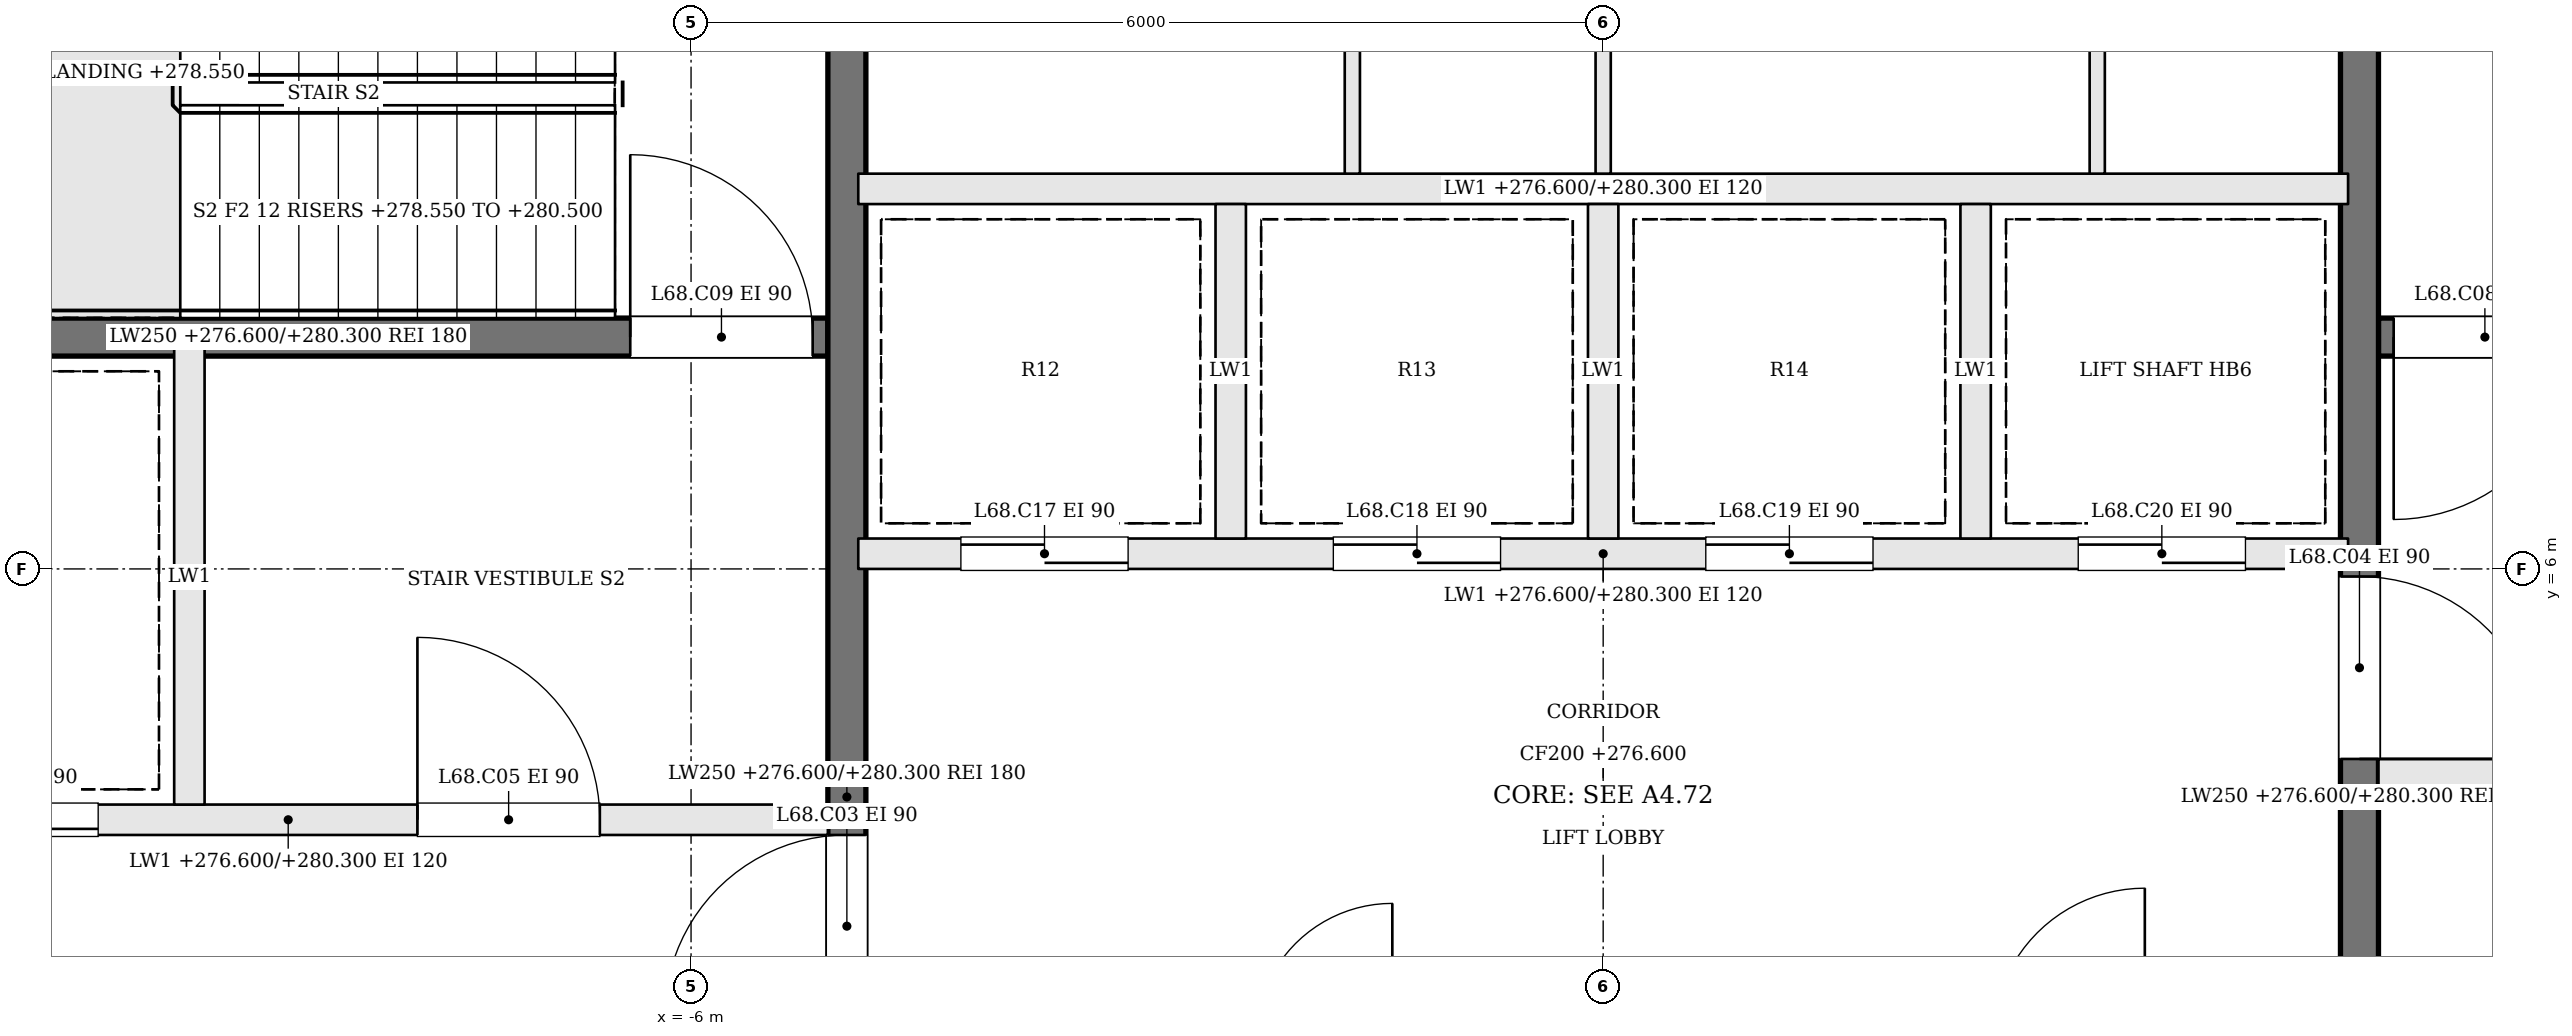
"""IFC4 building model, lengths in metres.
Left out: names, types, materials, properties, quantities, classifications, styles, units other than length and angle.
Written with IfcOpenShell. Run it as: python <this file> out.ifc"""

import sys

from ifc_helpers import new_model, si_unit, direction, frame, frame_2d, origin, place, context, subcontext, project, spatial, rectangle, extrude, element, fill, save


model = new_model("IFC4")
c1 = context("Model", 3, precision=1e-05, world=origin(), true_north=direction((0.0, 1.0)))
c2 = subcontext(c1, "Body", "Model", "MODEL_VIEW")
j1 = project(units=[si_unit("LENGTHUNIT", "METRE"), si_unit("PLANEANGLEUNIT", "RADIAN")], contexts=[c1])
p1 = place(None, origin())
s1 = spatial("IfcSite", under=j1, at=p1, CompositionType="ELEMENT")
p2 = place(p1, origin())
s2 = spatial("IfcBuilding", under=s1, at=p2, CompositionType="ELEMENT")
p3 = place(p2, frame((0.0, 0.0, 276.6)))
s3 = spatial("IfcBuildingStorey", under=s2, at=p3, CompositionType="ELEMENT", Elevation=276.6)
p4 = place(p3, frame((12.2, 7.525, 0.0), z_axis=(0.0, 0.0, 1.0), x_axis=(-1.0, 0.0, 0.0)))
e1 = element("IfcWall", 1, at=p4, inside=s3, PredefinedType="SOLIDWALL", context=c2, shape_type="SweptSolid", body=[
    extrude(rectangle(XDim=7.1, YDim=0.25, at=frame_2d((3.55, 0.0))), origin(), (0.0, 0.0, 1.0), 3.7),
])
p5 = place(p4, frame((5.8, 0.0, 0.0)))
e2 = element("IfcOpeningElement", 2, at=p5, cuts=e1, PredefinedType="OPENING", context=c2, shape_type="SweptSolid", body=[
    extrude(rectangle(XDim=1.2, YDim=2.1, at=frame_2d((0.6, 1.05))), frame((0.0, 0.135, 0.0), z_axis=(0.0, -1.0, 0.0), x_axis=(1.0, 0.0, 0.0)), (0.0, 0.0, 1.0), 0.27),
])
p6 = place(p3, frame((-12.2, 4.35, 0.0), z_axis=(0.0, 0.0, 1.0), x_axis=(1.0, 0.0, 0.0)))
e3 = element("IfcWall", 3, at=p6, inside=s3, PredefinedType="SOLIDWALL", context=c2, shape_type="SweptSolid", body=[
    extrude(rectangle(XDim=7.1, YDim=0.2, at=frame_2d((3.55, 0.0))), origin(), (0.0, 0.0, 1.0), 3.7),
])
p7 = place(p6, frame((4.4, 0.0, 0.0)))
e4 = element("IfcOpeningElement", 4, at=p7, cuts=e3, PredefinedType="OPENING", context=c2, shape_type="SweptSolid", body=[
    extrude(rectangle(XDim=1.2, YDim=2.1, at=frame_2d((0.6, 1.05))), frame((0.0, 0.11, 0.0), z_axis=(0.0, -1.0, 0.0), x_axis=(1.0, 0.0, 0.0)), (0.0, 0.0, 1.0), 0.22),
])
p8 = place(p6, frame((1.1, 0.0, 0.0)))
e5 = element("IfcOpeningElement", 5, at=p8, cuts=e3, PredefinedType="OPENING", context=c2, shape_type="SweptSolid", body=[
    extrude(rectangle(XDim=1.2, YDim=2.1, at=frame_2d((0.6, 1.05))), frame((0.0, 0.11, 0.0), z_axis=(0.0, -1.0, 0.0), x_axis=(1.0, 0.0, 0.0)), (0.0, 0.0, 1.0), 0.22),
])
p9 = place(p3, frame((12.2, 4.65, 0.0), z_axis=(0.0, 0.0, 1.0), x_axis=(-1.0, 0.0, 0.0)))
e6 = element("IfcWall", 6, at=p9, inside=s3, PredefinedType="SOLIDWALL", context=c2, shape_type="SweptSolid", body=[
    extrude(rectangle(XDim=7.1, YDim=0.2, at=frame_2d((3.55, 0.0))), origin(), (0.0, 0.0, 1.0), 3.7),
])
p10 = place(p9, frame((4.4, 0.0, 0.0)))
e7 = element("IfcOpeningElement", 7, at=p10, cuts=e6, PredefinedType="OPENING", context=c2, shape_type="SweptSolid", body=[
    extrude(rectangle(XDim=1.2, YDim=2.1, at=frame_2d((0.6, 1.05))), frame((0.0, 0.11, 0.0), z_axis=(0.0, -1.0, 0.0), x_axis=(1.0, 0.0, 0.0)), (0.0, 0.0, 1.0), 0.22),
])
p11 = place(p9, frame((1.1, 0.0, 0.0)))
e8 = element("IfcOpeningElement", 8, at=p11, cuts=e6, PredefinedType="OPENING", context=c2, shape_type="SweptSolid", body=[
    extrude(rectangle(XDim=1.2, YDim=2.1, at=frame_2d((0.6, 1.05))), frame((0.0, 0.11, 0.0), z_axis=(0.0, -1.0, 0.0), x_axis=(1.0, 0.0, 0.0)), (0.0, 0.0, 1.0), 0.22),
])
p12 = place(p3, frame((-12.2, 7.525, 0.0), z_axis=(0.0, 0.0, 1.0), x_axis=(1.0, 0.0, 0.0)))
e9 = element("IfcWall", 9, at=p12, inside=s3, PredefinedType="SOLIDWALL", context=c2, shape_type="SweptSolid", body=[
    extrude(rectangle(XDim=7.1, YDim=0.25, at=frame_2d((3.55, 0.0))), origin(), (0.0, 0.0, 1.0), 3.7),
])
p13 = place(p12, frame((5.8, 0.0, 0.0)))
e10 = element("IfcOpeningElement", 10, at=p13, cuts=e9, PredefinedType="OPENING", context=c2, shape_type="SweptSolid", body=[
    extrude(rectangle(XDim=1.2, YDim=2.1, at=frame_2d((0.6, 1.05))), frame((0.0, 0.135, 0.0), z_axis=(0.0, -1.0, 0.0), x_axis=(1.0, 0.0, 0.0)), (0.0, 0.0, 1.0), 0.27),
])
p14 = place(p3, frame((-9.3, 4.45, 0.0), z_axis=(0.0, 0.0, 1.0), x_axis=(0.0, 1.0, 0.0)))
e11 = element("IfcWall", 11, at=p14, inside=s3, PredefinedType="SOLIDWALL", context=c2, shape_type="SweptSolid", body=[
    extrude(rectangle(XDim=3.0, YDim=0.2, at=frame_2d((1.5, 0.0))), origin(), (0.0, 0.0, 1.0), 3.7),
])
p15 = place(p3, frame((-4.975, -2.2, 0.0), z_axis=(0.0, 0.0, 1.0), x_axis=(0.0, 1.0, 0.0)))
e12 = element("IfcWall", 12, at=p15, inside=s3, PredefinedType="SOLIDWALL", context=c2, shape_type="SweptSolid", body=[
    extrude(rectangle(XDim=13.4, YDim=0.25, at=frame_2d((6.7, 0.0))), origin(), (0.0, 0.0, 1.0), 3.7),
])
p16 = place(p15, frame((5.25, 0.0, 0.0)))
e13 = element("IfcOpeningElement", 13, at=p16, cuts=e12, PredefinedType="OPENING", context=c2, shape_type="SweptSolid", body=[
    extrude(rectangle(XDim=1.2, YDim=2.1, at=frame_2d((0.6, 1.05))), frame((0.0, 0.135, 0.0), z_axis=(0.0, -1.0, 0.0), x_axis=(1.0, 0.0, 0.0)), (0.0, 0.0, 1.0), 0.27),
])
p17 = place(p3, frame((4.975, 11.2, 0.0), z_axis=(0.0, 0.0, 1.0), x_axis=(0.0, -1.0, 0.0)))
e14 = element("IfcWall", 14, at=p17, inside=s3, PredefinedType="SOLIDWALL", context=c2, shape_type="SweptSolid", body=[
    extrude(rectangle(XDim=13.4, YDim=0.25, at=frame_2d((6.7, 0.0))), origin(), (0.0, 0.0, 1.0), 3.7),
])
p18 = place(p17, frame((5.25, 0.0, 0.0)))
e15 = element("IfcOpeningElement", 15, at=p18, cuts=e14, PredefinedType="OPENING", context=c2, shape_type="SweptSolid", body=[
    extrude(rectangle(XDim=1.2, YDim=2.1, at=frame_2d((0.6, 1.05))), frame((0.0, 0.135, 0.0), z_axis=(0.0, -1.0, 0.0), x_axis=(1.0, 0.0, 0.0)), (0.0, 0.0, 1.0), 0.27),
])
p19 = place(p3, frame((-4.9, 6.1, 0.0), z_axis=(0.0, 0.0, 1.0), x_axis=(1.0, 0.0, 0.0)))
e16 = element("IfcWall", 16, at=p19, inside=s3, PredefinedType="SOLIDWALL", context=c2, shape_type="SweptSolid", body=[
    extrude(rectangle(XDim=9.8, YDim=0.2, at=frame_2d((4.9, 0.0))), origin(), (0.0, 0.0, 1.0), 3.7),
])
p20 = place(p19, frame((0.675, 0.0, 0.0)))
e17 = element("IfcOpeningElement", 17, at=p20, cuts=e16, PredefinedType="OPENING", context=c2, shape_type="SweptSolid", body=[
    extrude(rectangle(XDim=1.1, YDim=2.1, at=frame_2d((0.55, 1.05))), frame((0.0, 0.11, 0.0), z_axis=(0.0, -1.0, 0.0), x_axis=(1.0, 0.0, 0.0)), (0.0, 0.0, 1.0), 0.22),
])
p21 = place(p19, frame((3.125, 0.0, 0.0)))
e18 = element("IfcOpeningElement", 18, at=p21, cuts=e16, PredefinedType="OPENING", context=c2, shape_type="SweptSolid", body=[
    extrude(rectangle(XDim=1.1, YDim=2.1, at=frame_2d((0.55, 1.05))), frame((0.0, 0.11, 0.0), z_axis=(0.0, -1.0, 0.0), x_axis=(1.0, 0.0, 0.0)), (0.0, 0.0, 1.0), 0.22),
])
p22 = place(p19, frame((5.575, 0.0, 0.0)))
e19 = element("IfcOpeningElement", 19, at=p22, cuts=e16, PredefinedType="OPENING", context=c2, shape_type="SweptSolid", body=[
    extrude(rectangle(XDim=1.1, YDim=2.1, at=frame_2d((0.55, 1.05))), frame((0.0, 0.11, 0.0), z_axis=(0.0, -1.0, 0.0), x_axis=(1.0, 0.0, 0.0)), (0.0, 0.0, 1.0), 0.22),
])
p23 = place(p19, frame((8.025, 0.0, 0.0)))
e20 = element("IfcOpeningElement", 20, at=p23, cuts=e16, PredefinedType="OPENING", context=c2, shape_type="SweptSolid", body=[
    extrude(rectangle(XDim=1.1, YDim=2.1, at=frame_2d((0.55, 1.05))), frame((0.0, 0.11, 0.0), z_axis=(0.0, -1.0, 0.0), x_axis=(1.0, 0.0, 0.0)), (0.0, 0.0, 1.0), 0.22),
])
p24 = place(p3, frame((-4.9, 8.5, 0.0), z_axis=(0.0, 0.0, 1.0), x_axis=(1.0, 0.0, 0.0)))
e21 = element("IfcWall", 21, at=p24, inside=s3, PredefinedType="SOLIDWALL", context=c2, shape_type="SweptSolid", body=[
    extrude(rectangle(XDim=9.8, YDim=0.2, at=frame_2d((4.9, 0.0))), origin(), (0.0, 0.0, 1.0), 3.7),
])
for number, where, z_axis, x_axis in (
    (22, (-2.45, 6.2, 0.0), (0.0, 0.0, 1.0), (0.0, 1.0, 0.0)),
    (23, (0.0, 6.2, 0.0), (0.0, 0.0, 1.0), (0.0, 1.0, 0.0)),
    (24, (2.45, 6.2, 0.0), (0.0, 0.0, 1.0), (0.0, 1.0, 0.0)),
):
    element("IfcWall", number, at=place(p3, frame(where, z_axis=z_axis, x_axis=x_axis)), inside=s3, PredefinedType="SOLIDWALL", context=c2, shape_type="SweptSolid", body=[
        extrude(rectangle(XDim=2.2, YDim=0.2, at=frame_2d((1.1, 0.0))), origin(), (0.0, 0.0, 1.0), 3.7),
    ])
for number, where, z_axis, x_axis in (
    (25, (-1.65, 8.6, 0.0), (0.0, 0.0, 1.0), (0.0, 1.0, 0.0)),
    (26, (0.0, 8.6, 0.0), (0.0, 0.0, 1.0), (0.0, 1.0, 0.0)),
    (27, (3.25, 8.6, 0.0), (0.0, 0.0, 1.0), (0.0, 1.0, 0.0)),
):
    element("IfcWall", number, at=place(p3, frame(where, z_axis=z_axis, x_axis=x_axis)), inside=s3, PredefinedType="PARTITIONING", context=c2, shape_type="SweptSolid", body=[
        extrude(rectangle(XDim=2.6, YDim=0.1, at=frame_2d((1.3, 0.0))), origin(), (0.0, 0.0, 1.0), 3.7),
    ])
p25 = place(p16, origin())
e28 = element("IfcDoor", 28, at=p25, inside=s3, OperationType="SINGLE_SWING_LEFT", PredefinedType="DOOR", context=c2, shape_type="SweptSolid", body=[
    extrude(rectangle(XDim=1.2, YDim=2.1, at=frame_2d((0.6, 1.05))), frame((0.0, 0.025, 0.0), z_axis=(0.0, -1.0, 0.0), x_axis=(1.0, 0.0, 0.0)), (0.0, 0.0, 1.0), 0.05),
])
fill(e13, e28)
p26 = place(p18, origin())
e29 = element("IfcDoor", 29, at=p26, inside=s3, OperationType="SINGLE_SWING_RIGHT", PredefinedType="DOOR", context=c2, shape_type="SweptSolid", body=[
    extrude(rectangle(XDim=1.2, YDim=2.1, at=frame_2d((0.6, 1.05))), frame((0.0, 0.025, 0.0), z_axis=(0.0, -1.0, 0.0), x_axis=(1.0, 0.0, 0.0)), (0.0, 0.0, 1.0), 0.05),
])
fill(e15, e29)
p27 = place(p7, origin())
e30 = element("IfcDoor", 30, at=p27, inside=s3, OperationType="SINGLE_SWING_LEFT", PredefinedType="DOOR", context=c2, shape_type="SweptSolid", body=[
    extrude(rectangle(XDim=1.2, YDim=2.1, at=frame_2d((0.6, 1.05))), frame((0.0, 0.025, 0.0), z_axis=(0.0, -1.0, 0.0), x_axis=(1.0, 0.0, 0.0)), (0.0, 0.0, 1.0), 0.05),
])
fill(e4, e30)
p28 = place(p5, origin())
e31 = element("IfcDoor", 31, at=p28, inside=s3, OperationType="SINGLE_SWING_RIGHT", PredefinedType="DOOR", context=c2, shape_type="SweptSolid", body=[
    extrude(rectangle(XDim=1.2, YDim=2.1, at=frame_2d((0.6, 1.05))), frame((0.0, 0.025, 0.0), z_axis=(0.0, -1.0, 0.0), x_axis=(1.0, 0.0, 0.0)), (0.0, 0.0, 1.0), 0.05),
])
fill(e2, e31)
p29 = place(p13, origin())
e32 = element("IfcDoor", 32, at=p29, inside=s3, OperationType="SINGLE_SWING_LEFT", PredefinedType="DOOR", context=c2, shape_type="SweptSolid", body=[
    extrude(rectangle(XDim=1.2, YDim=2.1, at=frame_2d((0.6, 1.05))), frame((0.0, 0.025, 0.0), z_axis=(0.0, -1.0, 0.0), x_axis=(1.0, 0.0, 0.0)), (0.0, 0.0, 1.0), 0.05),
])
fill(e10, e32)
p30 = place(p8, origin())
e33 = element("IfcDoor", 33, at=p30, inside=s3, OperationType="SLIDING_TO_RIGHT", PredefinedType="DOOR", context=c2, shape_type="SweptSolid", body=[
    extrude(rectangle(XDim=1.2, YDim=2.1, at=frame_2d((0.6, 1.05))), frame((0.0, 0.025, 0.0), z_axis=(0.0, -1.0, 0.0), x_axis=(1.0, 0.0, 0.0)), (0.0, 0.0, 1.0), 0.05),
])
fill(e5, e33)
p31 = place(p20, origin())
e34 = element("IfcDoor", 34, at=p31, inside=s3, OperationType="SLIDING_TO_RIGHT", PredefinedType="DOOR", context=c2, shape_type="SweptSolid", body=[
    extrude(rectangle(XDim=1.1, YDim=2.1, at=frame_2d((0.55, 1.05))), frame((0.0, 0.025, 0.0), z_axis=(0.0, -1.0, 0.0), x_axis=(1.0, 0.0, 0.0)), (0.0, 0.0, 1.0), 0.05),
])
fill(e17, e34)
p32 = place(p21, origin())
e35 = element("IfcDoor", 35, at=p32, inside=s3, OperationType="SLIDING_TO_LEFT", PredefinedType="DOOR", context=c2, shape_type="SweptSolid", body=[
    extrude(rectangle(XDim=1.1, YDim=2.1, at=frame_2d((0.55, 1.05))), frame((0.0, 0.025, 0.0), z_axis=(0.0, -1.0, 0.0), x_axis=(1.0, 0.0, 0.0)), (0.0, 0.0, 1.0), 0.05),
])
fill(e18, e35)
p33 = place(p22, origin())
e36 = element("IfcDoor", 36, at=p33, inside=s3, OperationType="SLIDING_TO_RIGHT", PredefinedType="DOOR", context=c2, shape_type="SweptSolid", body=[
    extrude(rectangle(XDim=1.1, YDim=2.1, at=frame_2d((0.55, 1.05))), frame((0.0, 0.025, 0.0), z_axis=(0.0, -1.0, 0.0), x_axis=(1.0, 0.0, 0.0)), (0.0, 0.0, 1.0), 0.05),
])
fill(e19, e36)
p34 = place(p23, origin())
e37 = element("IfcDoor", 37, at=p34, inside=s3, OperationType="SLIDING_TO_LEFT", PredefinedType="DOOR", context=c2, shape_type="SweptSolid", body=[
    extrude(rectangle(XDim=1.1, YDim=2.1, at=frame_2d((0.55, 1.05))), frame((0.0, 0.025, 0.0), z_axis=(0.0, -1.0, 0.0), x_axis=(1.0, 0.0, 0.0)), (0.0, 0.0, 1.0), 0.05),
])
fill(e20, e37)
save(model, sys.argv[1])
